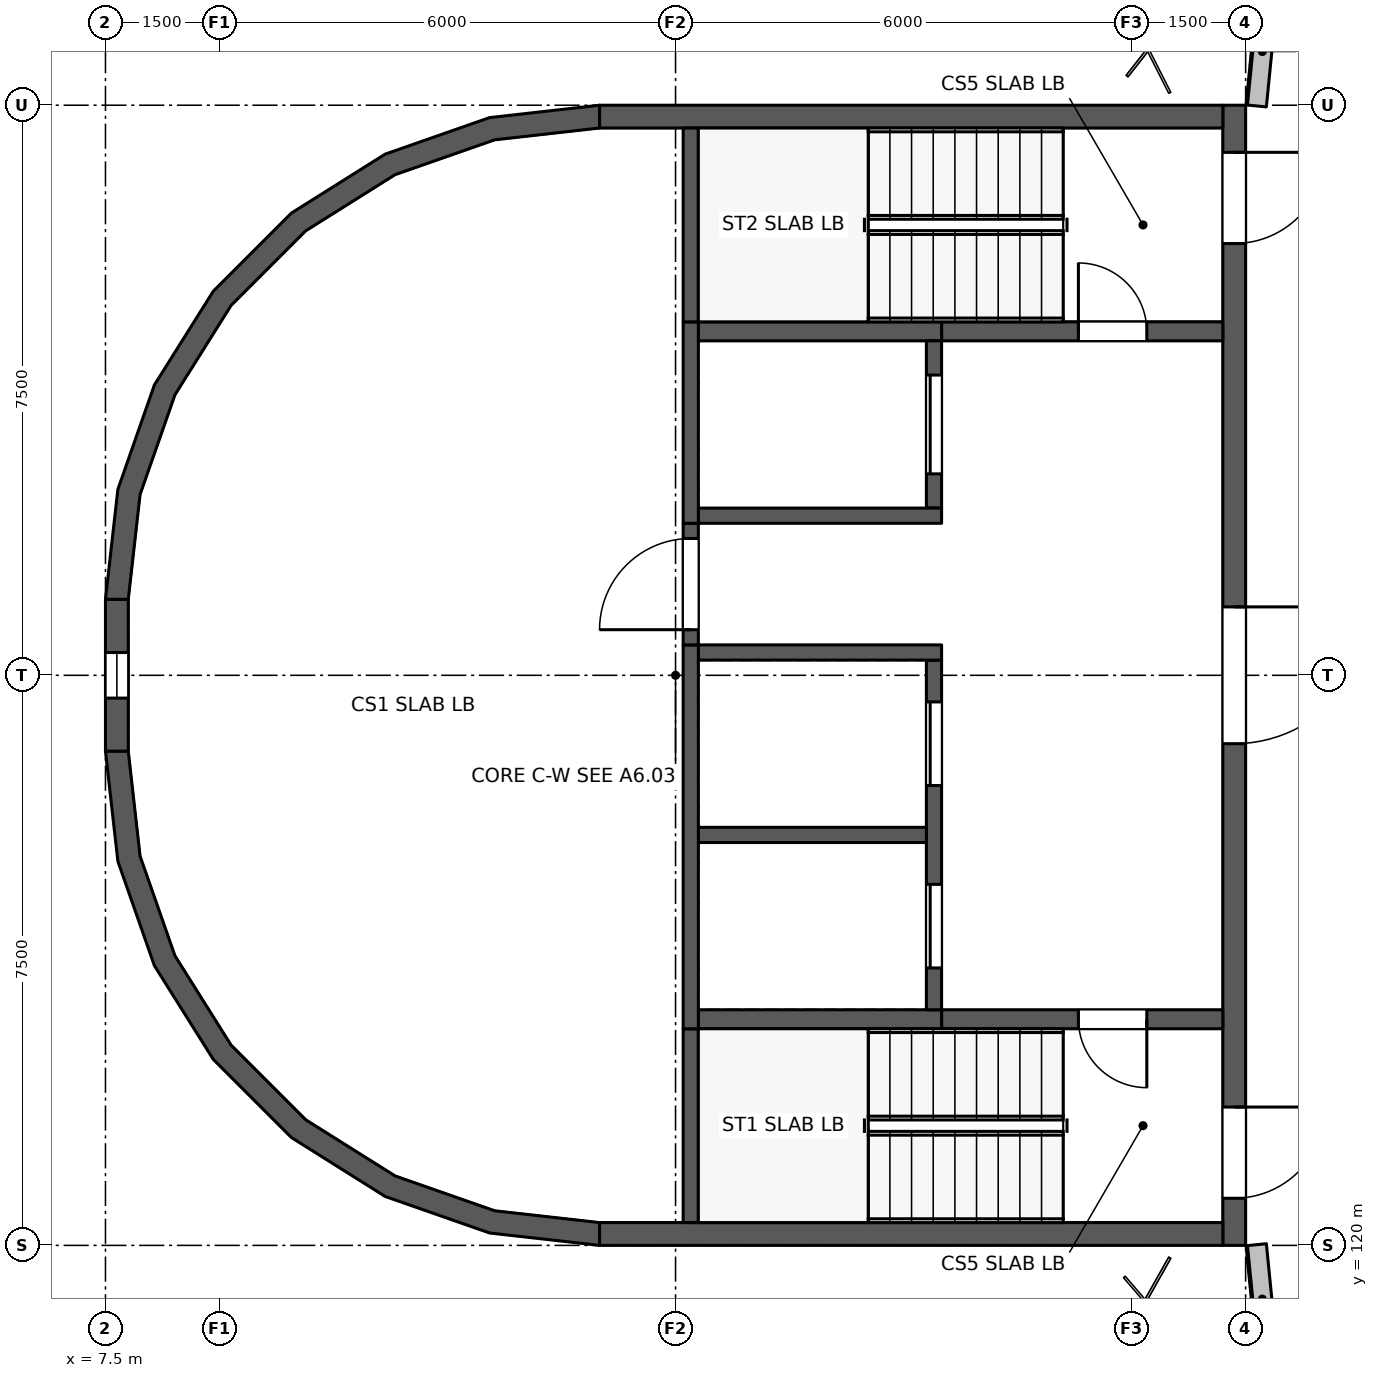
"""IFC4 building model, lengths in metres.
Left out: names, types, materials, properties, quantities, classifications, styles, units other than length and angle.
Written with IfcOpenShell. Run it as: python <this file> out.ifc"""

import sys

from ifc_helpers import new_model, si_unit, direction, frame, frame_2d, origin, place, context, subcontext, project, spatial, polyline, rectangle, outline, extrude, element, fill, save


model = new_model("IFC4")
c1 = context("Model", 3, precision=1e-05, world=origin(), true_north=direction((0.0, 1.0)))
c2 = subcontext(c1, "Body", "Model", "MODEL_VIEW")
j1 = project(units=[si_unit("LENGTHUNIT", "METRE"), si_unit("PLANEANGLEUNIT", "RADIAN")], contexts=[c1])
p1 = place(None, origin())
s1 = spatial("IfcSite", under=j1, at=p1, CompositionType="ELEMENT")
p2 = place(p1, origin())
s2 = spatial("IfcBuilding", under=s1, at=p2, CompositionType="ELEMENT")
p3 = place(p2, frame((0.0, 0.0, 6.6)))
s3 = spatial("IfcBuildingStorey", under=s2, at=p3, CompositionType="ELEMENT", Elevation=6.6)
p4 = place(p3, frame((22.79, 136.423, 0.0), z_axis=(0.0, 0.0, 1.0), x_axis=(-0.098479948823, -0.995139035351, 0.0)))
e1 = element("IfcWall", 1, at=p4, inside=s3, PredefinedType="SOLIDWALL", context=c2, shape_type="SweptSolid", body=[
    extrude(rectangle(XDim=1.44, YDim=0.25, at=frame_2d((0.72, 0.0))), origin(), (0.0, 0.0, 1.0), 1.1),
])
p5 = place(p3, frame((22.648, 120.01, 0.0), z_axis=(0.0, 0.0, 1.0), x_axis=(0.098664443357, -0.995120760319, 0.0)))
e2 = element("IfcWall", 2, at=p5, inside=s3, PredefinedType="SOLIDWALL", context=c2, shape_type="SweptSolid", body=[
    extrude(rectangle(XDim=1.44, YDim=0.25, at=frame_2d((0.72, 0.0))), origin(), (0.0, 0.0, 1.0), 1.1),
])
p6 = place(p3, frame((22.35, 135.0, 0.0), z_axis=(0.0, 0.0, 1.0), x_axis=(0.0, -1.0, 0.0)))
e3 = element("IfcWall", 3, at=p6, inside=s3, PredefinedType="SHEAR", context=c2, shape_type="SweptSolid", body=[
    extrude(rectangle(XDim=15.0, YDim=0.3, at=frame_2d((7.5, 0.0))), origin(), (0.0, 0.0, 1.0), 3.3),
])
p7 = place(p6, frame((13.18, 0.0, 0.0)))
e4 = element("IfcOpeningElement", 4, at=p7, cuts=e3, PredefinedType="OPENING", context=c2, shape_type="SweptSolid", body=[
    extrude(rectangle(XDim=1.2, YDim=2.1, at=frame_2d((0.6, 1.05))), frame((0.0, 0.16, 0.0), z_axis=(0.0, -1.0, 0.0), x_axis=(1.0, 0.0, 0.0)), (0.0, 0.0, 1.0), 0.32),
])
p8 = place(p6, frame((0.62, 0.0, 0.0)))
e5 = element("IfcOpeningElement", 5, at=p8, cuts=e3, PredefinedType="OPENING", context=c2, shape_type="SweptSolid", body=[
    extrude(rectangle(XDim=1.2, YDim=2.1, at=frame_2d((0.6, 1.05))), frame((0.0, 0.16, 0.0), z_axis=(0.0, -1.0, 0.0), x_axis=(1.0, 0.0, 0.0)), (0.0, 0.0, 1.0), 0.32),
])
p9 = place(p6, frame((6.6, 0.0, 0.0)))
e6 = element("IfcOpeningElement", 6, at=p9, cuts=e3, PredefinedType="OPENING", context=c2, shape_type="SweptSolid", body=[
    extrude(rectangle(XDim=1.8, YDim=2.1, at=frame_2d((0.9, 1.05))), frame((0.0, 0.16, 0.0), z_axis=(0.0, -1.0, 0.0), x_axis=(1.0, 0.0, 0.0)), (0.0, 0.0, 1.0), 0.32),
])
p10 = place(p3, frame((7.65, 126.5, 0.0), z_axis=(0.0, 0.0, 1.0), x_axis=(0.0, 1.0, 0.0)))
e7 = element("IfcWall", 7, at=p10, inside=s3, PredefinedType="SHEAR", context=c2, shape_type="SweptSolid", body=[
    extrude(rectangle(XDim=2.0, YDim=0.3, at=frame_2d((1.0, 0.0))), origin(), (0.0, 0.0, 1.0), 3.3),
])
p11 = place(p10, frame((0.7, 0.0, 0.3)))
e8 = element("IfcOpeningElement", 8, at=p11, cuts=e7, PredefinedType="OPENING", context=c2, shape_type="SweptSolid", body=[
    extrude(rectangle(XDim=0.6, YDim=2.7, at=frame_2d((0.3, 1.35))), frame((0.0, 0.16, 0.0), z_axis=(0.0, -1.0, 0.0), x_axis=(1.0, 0.0, 0.0)), (0.0, 0.0, 1.0), 0.32),
])
for number, where, z_axis, x_axis in (
    (9, (22.2, 120.15, 0.0), (0.0, 0.0, 1.0), (-1.0, 0.0, 0.0)),
    (10, (14.0, 134.85, 0.0), (0.0, 0.0, 1.0), (1.0, 0.0, 0.0)),
):
    element("IfcWall", number, at=place(p3, frame(where, z_axis=z_axis, x_axis=x_axis)), inside=s3, PredefinedType="SHEAR", context=c2, shape_type="SweptSolid", body=[
        extrude(rectangle(XDim=8.2, YDim=0.3, at=frame_2d((4.1, 0.0))), origin(), (0.0, 0.0, 1.0), 3.3),
    ])
p12 = place(p3, frame((22.2, 122.975, 0.0), z_axis=(0.0, 0.0, 1.0), x_axis=(-1.0, 0.0, 0.0)))
e11 = element("IfcWall", 11, at=p12, inside=s3, PredefinedType="STANDARD", context=c2, shape_type="SweptSolid", body=[
    extrude(rectangle(XDim=3.7, YDim=0.25, at=frame_2d((1.85, 0.0))), origin(), (0.0, 0.0, 1.0), 3.1),
])
p13 = place(p12, frame((1.0, 0.0, 0.0)))
e12 = element("IfcOpeningElement", 12, at=p13, cuts=e11, PredefinedType="OPENING", context=c2, shape_type="SweptSolid", body=[
    extrude(rectangle(XDim=0.9, YDim=2.1, at=frame_2d((0.45, 1.05))), frame((0.0, 0.135, 0.0), z_axis=(0.0, -1.0, 0.0), x_axis=(1.0, 0.0, 0.0)), (0.0, 0.0, 1.0), 0.27),
])
p14 = place(p3, frame((18.5, 122.975, 0.0), z_axis=(0.0, 0.0, 1.0), x_axis=(-1.0, 0.0, 0.0)))
e13 = element("IfcWall", 13, at=p14, inside=s3, PredefinedType="STANDARD", context=c2, shape_type="SweptSolid", body=[
    extrude(rectangle(XDim=3.2, YDim=0.25, at=frame_2d((1.6, 0.0))), origin(), (0.0, 0.0, 1.0), 3.1),
])
p15 = place(p3, frame((18.5, 132.025, 0.0), z_axis=(0.0, 0.0, 1.0), x_axis=(1.0, 0.0, 0.0)))
e14 = element("IfcWall", 14, at=p15, inside=s3, PredefinedType="STANDARD", context=c2, shape_type="SweptSolid", body=[
    extrude(rectangle(XDim=3.7, YDim=0.25, at=frame_2d((1.85, 0.0))), origin(), (0.0, 0.0, 1.0), 3.1),
])
p16 = place(p15, frame((1.8, 0.0, 0.0)))
e15 = element("IfcOpeningElement", 15, at=p16, cuts=e14, PredefinedType="OPENING", context=c2, shape_type="SweptSolid", body=[
    extrude(rectangle(XDim=0.9, YDim=2.1, at=frame_2d((0.45, 1.05))), frame((0.0, 0.135, 0.0), z_axis=(0.0, -1.0, 0.0), x_axis=(1.0, 0.0, 0.0)), (0.0, 0.0, 1.0), 0.27),
])
p17 = place(p3, frame((18.5, 132.025, 0.0), z_axis=(0.0, 0.0, 1.0), x_axis=(-1.0, 0.0, 0.0)))
e16 = element("IfcWall", 16, at=p17, inside=s3, PredefinedType="STANDARD", context=c2, shape_type="SweptSolid", body=[
    extrude(rectangle(XDim=3.2, YDim=0.25, at=frame_2d((1.6, 0.0))), origin(), (0.0, 0.0, 1.0), 3.1),
])
p18 = place(p3, frame((18.4, 123.1, 0.0), z_axis=(0.0, 0.0, 1.0), x_axis=(0.0, 1.0, 0.0)))
e17 = element("IfcWall", 17, at=p18, inside=s3, PredefinedType="STANDARD", context=c2, shape_type="SweptSolid", body=[
    extrude(rectangle(XDim=4.6, YDim=0.2, at=frame_2d((2.3, 0.0))), origin(), (0.0, 0.0, 1.0), 3.1),
])
p19 = place(p18, frame((0.55, 0.0, 0.0)))
e18 = element("IfcOpeningElement", 18, at=p19, cuts=e17, PredefinedType="OPENING", context=c2, shape_type="SweptSolid", body=[
    extrude(rectangle(XDim=1.1, YDim=2.1, at=frame_2d((0.55, 1.05))), frame((0.0, 0.11, 0.0), z_axis=(0.0, -1.0, 0.0), x_axis=(1.0, 0.0, 0.0)), (0.0, 0.0, 1.0), 0.22),
])
p20 = place(p18, frame((2.95, 0.0, 0.0)))
e19 = element("IfcOpeningElement", 19, at=p20, cuts=e17, PredefinedType="OPENING", context=c2, shape_type="SweptSolid", body=[
    extrude(rectangle(XDim=1.1, YDim=2.1, at=frame_2d((0.55, 1.05))), frame((0.0, 0.11, 0.0), z_axis=(0.0, -1.0, 0.0), x_axis=(1.0, 0.0, 0.0)), (0.0, 0.0, 1.0), 0.22),
])
p21 = place(p3, frame((18.4, 129.7, 0.0), z_axis=(0.0, 0.0, 1.0), x_axis=(0.0, 1.0, 0.0)))
e20 = element("IfcWall", 20, at=p21, inside=s3, PredefinedType="STANDARD", context=c2, shape_type="SweptSolid", body=[
    extrude(rectangle(XDim=2.2, YDim=0.2, at=frame_2d((1.1, 0.0))), origin(), (0.0, 0.0, 1.0), 3.1),
])
p22 = place(p21, frame((0.45, 0.0, 0.0)))
e21 = element("IfcOpeningElement", 21, at=p22, cuts=e20, PredefinedType="OPENING", context=c2, shape_type="SweptSolid", body=[
    extrude(rectangle(XDim=1.3, YDim=2.1, at=frame_2d((0.65, 1.05))), frame((0.0, 0.11, 0.0), z_axis=(0.0, -1.0, 0.0), x_axis=(1.0, 0.0, 0.0)), (0.0, 0.0, 1.0), 0.22),
])
p23 = place(p3, frame((18.3, 125.4, 0.0), z_axis=(0.0, 0.0, 1.0), x_axis=(-1.0, 0.0, 0.0)))
e22 = element("IfcWall", 22, at=p23, inside=s3, PredefinedType="STANDARD", context=c2, shape_type="SweptSolid", body=[
    extrude(rectangle(XDim=3.0, YDim=0.2, at=frame_2d((1.5, 0.0))), origin(), (0.0, 0.0, 1.0), 3.1),
])
for number, where, z_axis, x_axis in (
    (23, (18.5, 127.8, 0.0), (0.0, 0.0, 1.0), (-1.0, 0.0, 0.0)),
    (24, (18.5, 129.6, 0.0), (0.0, 0.0, 1.0), (-1.0, 0.0, 0.0)),
):
    element("IfcWall", number, at=place(p3, frame(where, z_axis=z_axis, x_axis=x_axis)), inside=s3, PredefinedType="STANDARD", context=c2, shape_type="SweptSolid", body=[
        extrude(rectangle(XDim=3.2, YDim=0.2, at=frame_2d((1.6, 0.0))), origin(), (0.0, 0.0, 1.0), 3.1),
    ])
p24 = place(p3, frame((15.2, 120.3, 0.0), z_axis=(0.0, 0.0, 1.0), x_axis=(0.0, 1.0, 0.0)))
e25 = element("IfcWall", 25, at=p24, inside=s3, PredefinedType="STANDARD", context=c2, shape_type="SweptSolid", body=[
    extrude(rectangle(XDim=2.55, YDim=0.2, at=frame_2d((1.275, 0.0))), origin(), (0.0, 0.0, 1.0), 3.1),
])
p25 = place(p3, frame((15.2, 122.85, 0.0), z_axis=(0.0, 0.0, 1.0), x_axis=(0.0, 1.0, 0.0)))
e26 = element("IfcWall", 26, at=p25, inside=s3, PredefinedType="STANDARD", context=c2, shape_type="SweptSolid", body=[
    extrude(rectangle(XDim=5.05, YDim=0.2, at=frame_2d((2.525, 0.0))), origin(), (0.0, 0.0, 1.0), 3.1),
])
p26 = place(p3, frame((15.2, 127.9, 0.0), z_axis=(0.0, 0.0, 1.0), x_axis=(0.0, 1.0, 0.0)))
e27 = element("IfcWall", 27, at=p26, inside=s3, PredefinedType="STANDARD", context=c2, shape_type="SweptSolid", body=[
    extrude(rectangle(XDim=1.6, YDim=0.2, at=frame_2d((0.8, 0.0))), origin(), (0.0, 0.0, 1.0), 3.1),
])
p27 = place(p26, frame((0.2, 0.0, 0.0)))
e28 = element("IfcOpeningElement", 28, at=p27, cuts=e27, PredefinedType="OPENING", context=c2, shape_type="SweptSolid", body=[
    extrude(rectangle(XDim=1.2, YDim=2.1, at=frame_2d((0.6, 1.05))), frame((0.0, 0.11, 0.0), z_axis=(0.0, -1.0, 0.0), x_axis=(1.0, 0.0, 0.0)), (0.0, 0.0, 1.0), 0.22),
])
p28 = place(p3, frame((15.2, 129.5, 0.0), z_axis=(0.0, 0.0, 1.0), x_axis=(0.0, 1.0, 0.0)))
e29 = element("IfcWall", 29, at=p28, inside=s3, PredefinedType="STANDARD", context=c2, shape_type="SweptSolid", body=[
    extrude(rectangle(XDim=2.65, YDim=0.2, at=frame_2d((1.325, 0.0))), origin(), (0.0, 0.0, 1.0), 3.1),
])
p29 = place(p3, frame((15.2, 132.15, 0.0), z_axis=(0.0, 0.0, 1.0), x_axis=(0.0, 1.0, 0.0)))
e30 = element("IfcWall", 30, at=p29, inside=s3, PredefinedType="STANDARD", context=c2, shape_type="SweptSolid", body=[
    extrude(rectangle(XDim=2.55, YDim=0.2, at=frame_2d((1.275, 0.0))), origin(), (0.0, 0.0, 1.0), 3.1),
])
p30 = place(p3, origin())
e31 = element("IfcWall", 31, at=p30, inside=s3, PredefinedType="SHEAR", context=c2, shape_type="SweptSolid", body=[
    extrude(outline(polyline([(14.0, 120.0), (12.554, 120.163), (11.18, 120.644), (9.947, 121.418), (8.918, 122.447), (8.144, 123.68), (7.663, 125.054), (7.5, 126.5), (7.8, 126.5), (7.955, 125.12), (8.414, 123.81), (9.153, 122.635), (10.135, 121.653), (11.31, 120.914), (12.62, 120.455), (14.0, 120.3), (14.0, 120.0)])), origin(), (0.0, 0.0, 1.0), 3.3),
])
p31 = place(p3, origin())
e32 = element("IfcWall", 32, at=p31, inside=s3, PredefinedType="SHEAR", context=c2, shape_type="SweptSolid", body=[
    extrude(outline(polyline([(14.0, 135.0), (12.554, 134.837), (11.18, 134.356), (9.947, 133.582), (8.918, 132.553), (8.144, 131.32), (7.663, 129.946), (7.5, 128.5), (7.8, 128.5), (7.955, 129.88), (8.414, 131.19), (9.153, 132.365), (10.135, 133.347), (11.31, 134.086), (12.62, 134.545), (14.0, 134.7), (14.0, 135.0)])), origin(), (0.0, 0.0, 1.0), 3.3),
])
p32 = place(p7, origin())
e33 = element("IfcDoor", 33, at=p32, inside=s3, OperationType="SINGLE_SWING_RIGHT", PredefinedType="DOOR", context=c2, shape_type="SweptSolid", body=[
    extrude(rectangle(XDim=1.2, YDim=2.1, at=frame_2d((0.6, 1.05))), frame((0.0, 0.025, 0.0), z_axis=(0.0, -1.0, 0.0), x_axis=(1.0, 0.0, 0.0)), (0.0, 0.0, 1.0), 0.05),
])
fill(e4, e33)
p33 = place(p8, origin())
e34 = element("IfcDoor", 34, at=p33, inside=s3, OperationType="SINGLE_SWING_LEFT", PredefinedType="DOOR", context=c2, shape_type="SweptSolid", body=[
    extrude(rectangle(XDim=1.2, YDim=2.1, at=frame_2d((0.6, 1.05))), frame((0.0, 0.025, 0.0), z_axis=(0.0, -1.0, 0.0), x_axis=(1.0, 0.0, 0.0)), (0.0, 0.0, 1.0), 0.05),
])
fill(e5, e34)
p34 = place(p9, origin())
e35 = element("IfcDoor", 35, at=p34, inside=s3, OperationType="DOUBLE_DOOR_SINGLE_SWING", PredefinedType="DOOR", context=c2, shape_type="SweptSolid", body=[
    extrude(rectangle(XDim=1.8, YDim=2.1, at=frame_2d((0.9, 1.05))), frame((0.0, 0.025, 0.0), z_axis=(0.0, -1.0, 0.0), x_axis=(1.0, 0.0, 0.0)), (0.0, 0.0, 1.0), 0.05),
])
fill(e6, e35)
p35 = place(p13, origin())
e36 = element("IfcDoor", 36, at=p35, inside=s3, OperationType="SINGLE_SWING_LEFT", PredefinedType="DOOR", context=c2, shape_type="SweptSolid", body=[
    extrude(rectangle(XDim=0.9, YDim=2.1, at=frame_2d((0.45, 1.05))), frame((0.0, 0.025, 0.0), z_axis=(0.0, -1.0, 0.0), x_axis=(1.0, 0.0, 0.0)), (0.0, 0.0, 1.0), 0.05),
])
fill(e12, e36)
p36 = place(p16, origin())
e37 = element("IfcDoor", 37, at=p36, inside=s3, OperationType="SINGLE_SWING_RIGHT", PredefinedType="DOOR", context=c2, shape_type="SweptSolid", body=[
    extrude(rectangle(XDim=0.9, YDim=2.1, at=frame_2d((0.45, 1.05))), frame((0.0, 0.025, 0.0), z_axis=(0.0, -1.0, 0.0), x_axis=(1.0, 0.0, 0.0)), (0.0, 0.0, 1.0), 0.05),
])
fill(e15, e37)
p37 = place(p19, origin())
e38 = element("IfcDoor", 38, at=p37, inside=s3, OperationType="DOUBLE_DOOR_SLIDING", PredefinedType="DOOR", context=c2, shape_type="SweptSolid", body=[
    extrude(rectangle(XDim=1.1, YDim=2.1, at=frame_2d((0.55, 1.05))), frame((0.0, 0.025, 0.0), z_axis=(0.0, -1.0, 0.0), x_axis=(1.0, 0.0, 0.0)), (0.0, 0.0, 1.0), 0.05),
])
fill(e18, e38)
p38 = place(p20, origin())
e39 = element("IfcDoor", 39, at=p38, inside=s3, OperationType="DOUBLE_DOOR_SLIDING", PredefinedType="DOOR", context=c2, shape_type="SweptSolid", body=[
    extrude(rectangle(XDim=1.1, YDim=2.1, at=frame_2d((0.55, 1.05))), frame((0.0, 0.025, 0.0), z_axis=(0.0, -1.0, 0.0), x_axis=(1.0, 0.0, 0.0)), (0.0, 0.0, 1.0), 0.05),
])
fill(e19, e39)
p39 = place(p22, origin())
e40 = element("IfcDoor", 40, at=p39, inside=s3, OperationType="DOUBLE_DOOR_SLIDING", PredefinedType="DOOR", context=c2, shape_type="SweptSolid", body=[
    extrude(rectangle(XDim=1.3, YDim=2.1, at=frame_2d((0.65, 1.05))), frame((0.0, 0.025, 0.0), z_axis=(0.0, -1.0, 0.0), x_axis=(1.0, 0.0, 0.0)), (0.0, 0.0, 1.0), 0.05),
])
fill(e21, e40)
p40 = place(p27, origin())
e41 = element("IfcDoor", 41, at=p40, inside=s3, OperationType="SINGLE_SWING_RIGHT", PredefinedType="DOOR", context=c2, shape_type="SweptSolid", body=[
    extrude(rectangle(XDim=1.2, YDim=2.1, at=frame_2d((0.6, 1.05))), frame((0.0, 0.025, 0.0), z_axis=(0.0, -1.0, 0.0), x_axis=(1.0, 0.0, 0.0)), (0.0, 0.0, 1.0), 0.05),
])
fill(e28, e41)
p41 = place(p11, origin())
e42 = element("IfcWindow", 42, at=p41, inside=s3, PartitioningType="SINGLE_PANEL", PredefinedType="WINDOW", context=c2, shape_type="SweptSolid", body=[
    extrude(rectangle(XDim=0.6, YDim=2.7, at=frame_2d((0.3, 1.35))), frame((0.0, 0.03, 0.0), z_axis=(0.0, -1.0, 0.0), x_axis=(1.0, 0.0, 0.0)), (0.0, 0.0, 1.0), 0.06),
])
fill(e8, e42)
save(model, sys.argv[1])
